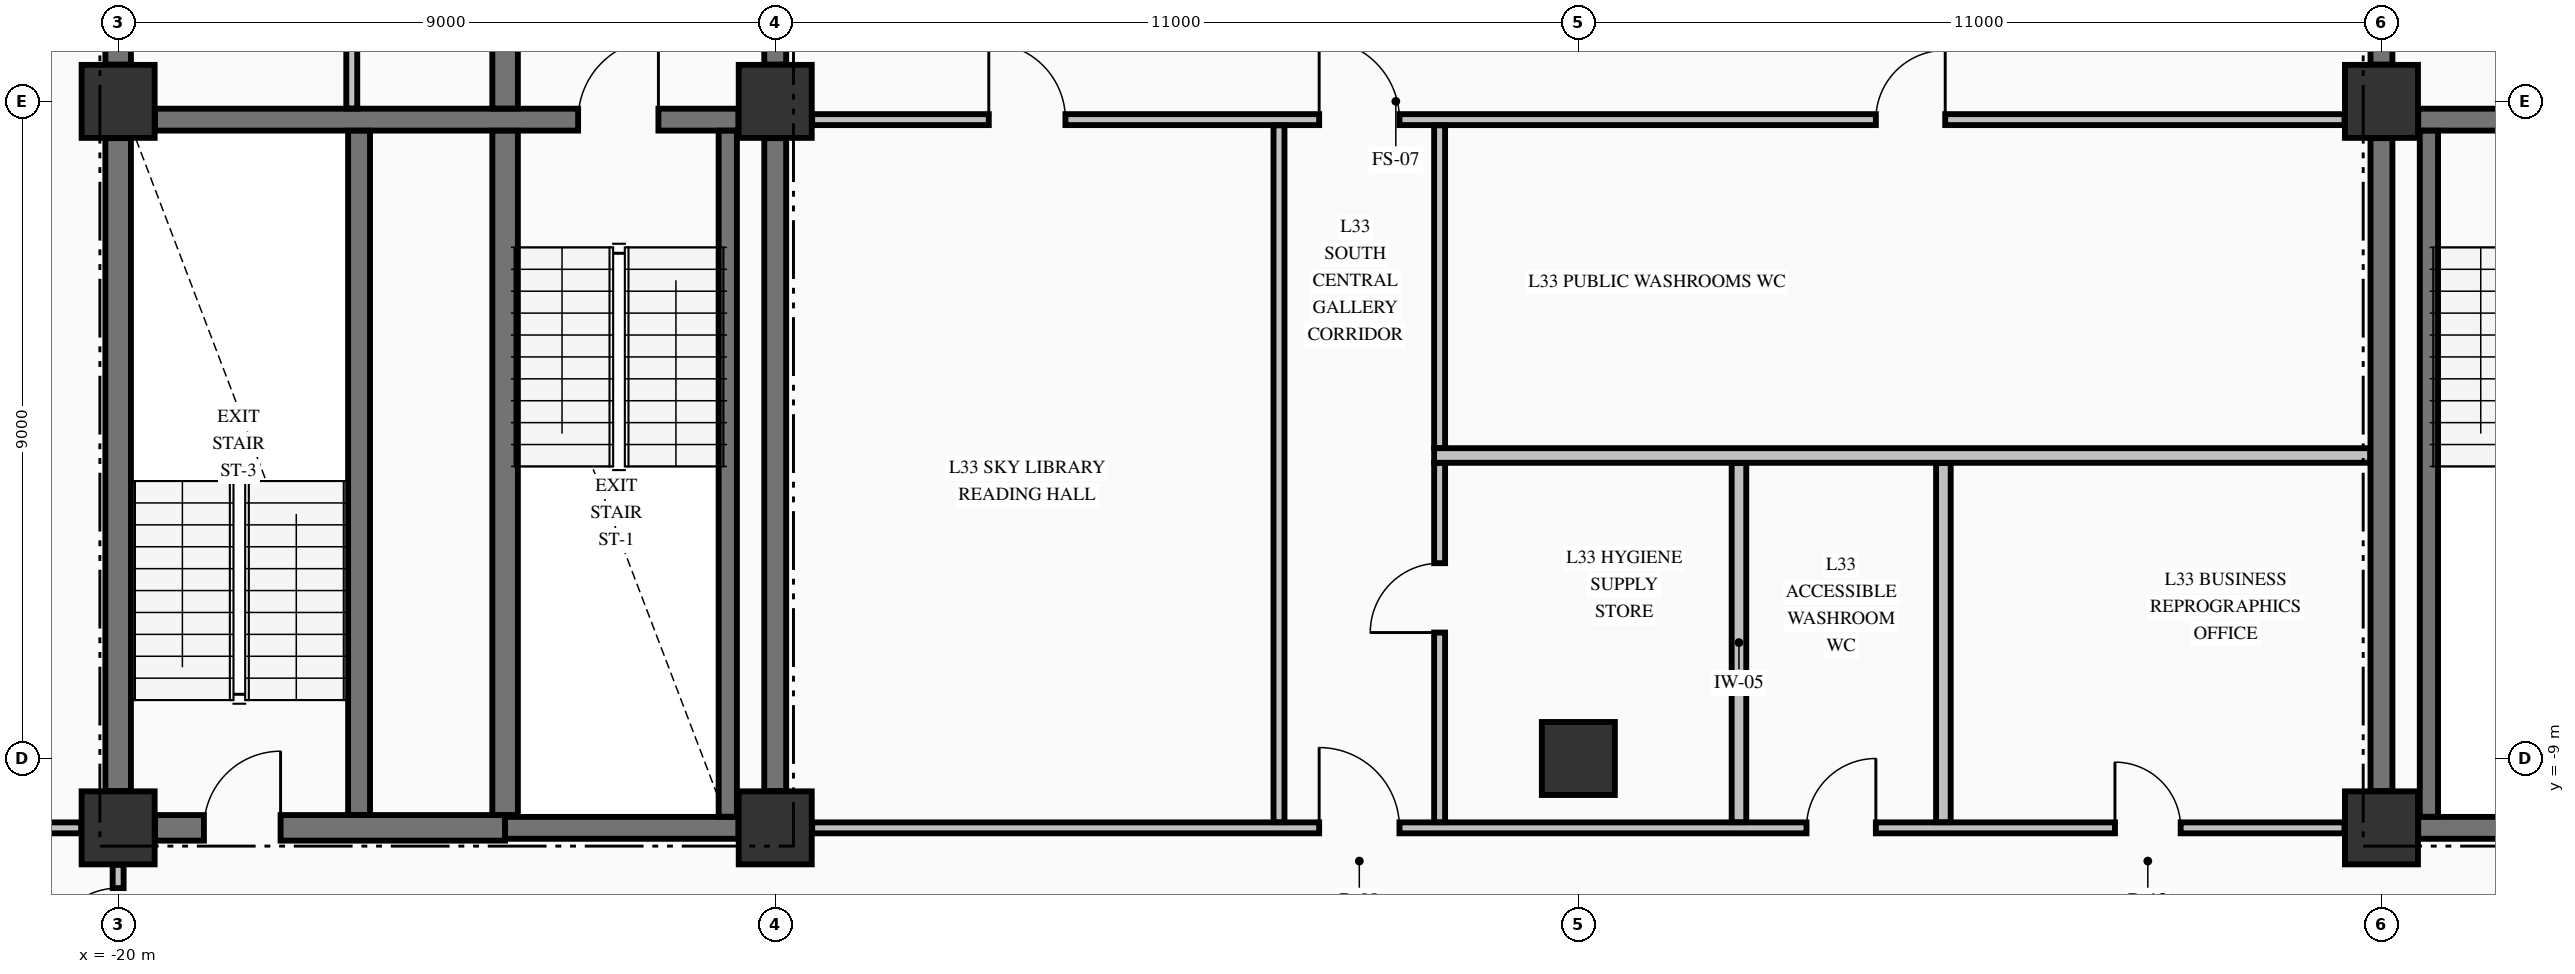
"""IFC4 building model, lengths in metres.
Left out: names, types, materials, properties, quantities, classifications, styles, units other than length and angle.
Written with IfcOpenShell. Run it as: python <this file> out.ifc"""

import sys

from ifc_helpers import new_model, si_unit, direction, frame, frame_2d, origin, origin_2d, place, context, subcontext, project, spatial, rectangle, extrude, element, fill, save


model = new_model("IFC4")
c1 = context("Model", 3, precision=1e-05, world=origin(), true_north=direction((0.0, 1.0)))
c2 = subcontext(c1, "Body", "Model", "MODEL_VIEW")
j1 = project(units=[si_unit("LENGTHUNIT", "METRE"), si_unit("PLANEANGLEUNIT", "RADIAN")], contexts=[c1])
p1 = place(None, origin())
s1 = spatial("IfcSite", under=j1, at=p1, CompositionType="ELEMENT")
p2 = place(p1, origin())
s2 = spatial("IfcBuilding", under=s1, at=p2, CompositionType="ELEMENT")
p3 = place(p2, frame((0.0, 0.0, 132.06)))
s3 = spatial("IfcBuildingStorey", under=s2, at=p3, CompositionType="ELEMENT", Elevation=132.06)
for number, where, z_axis, x_axis in (
    (1, (-20.0, -9.95, -0.25), (0.0, 0.0, 1.0), (1.0, 0.0, 0.0)),
    (2, (-11.0, -9.95, -0.25), (0.0, 0.0, 1.0), (1.0, 0.0, 0.0)),
    (3, (-11.0, 0.0, -0.25), (0.0, 0.0, 1.0), (1.0, 0.0, 0.0)),
    (4, (11.0, -9.95, -0.25), (0.0, 0.0, 1.0), (1.0, 0.0, 0.0)),
    (5, (11.0, 0.0, -0.25), (0.0, 0.0, 1.0), (1.0, 0.0, 0.0)),
    (6, (0.0, -9.0, -0.25), (0.0, 0.0, 1.0), (1.0, 0.0, 0.0)),
    (7, (-20.0, 0.0, -0.25), (0.0, 0.0, 1.0), (1.0, 0.0, 0.0)),
):
    element("IfcColumn", number, at=place(p3, frame(where, z_axis=z_axis, x_axis=x_axis)), inside=s3, PredefinedType="COLUMN", context=c2, shape_type="SweptSolid", body=[
        extrude(rectangle(XDim=1.0, YDim=1.0, at=origin_2d()), origin(), (0.0, 0.0, 1.0), 3.57),
    ])
p4 = place(p3, frame((-19.496, -9.95, 0.0), z_axis=(0.0, 0.0, 1.0), x_axis=(1.0, 0.0, 0.0)))
e8 = element("IfcWall", 8, at=p4, inside=s3, PredefinedType="SHEAR", context=c2, shape_type="SweptSolid", body=[
    extrude(rectangle(XDim=4.796, YDim=0.35, at=frame_2d((2.398, 0.0))), origin(), (0.0, 0.0, 1.0), 3.32),
])
p5 = place(p4, frame((0.671, 0.0, 0.0)))
e9 = element("IfcOpeningElement", 9, at=p5, cuts=e8, PredefinedType="OPENING", context=c2, shape_type="SweptSolid", body=[
    extrude(rectangle(XDim=1.05, YDim=2.15, at=frame_2d((0.525, 1.075))), frame((0.0, 0.185, 0.0), z_axis=(0.0, -1.0, 0.0), x_axis=(1.0, 0.0, 0.0)), (0.0, 0.0, 1.0), 0.37),
])
for number, where, z_axis, x_axis in (
    (10, (-14.7, -9.95, 0.0), (0.0, 0.0, 1.0), (1.0, 0.0, 0.0)),
    (11, (11.504, -9.95, 0.0), (0.0, 0.0, 1.0), (1.0, 0.0, 0.0)),
):
    element("IfcWall", number, at=place(p3, frame(where, z_axis=z_axis, x_axis=x_axis)), inside=s3, PredefinedType="SHEAR", context=c2, shape_type="SweptSolid", body=[
        extrude(rectangle(XDim=3.196, YDim=0.3, at=frame_2d((1.598, 0.0))), origin(), (0.0, 0.0, 1.0), 3.32),
    ])
p6 = place(p3, frame((-19.496, -0.25, 0.0), z_axis=(0.0, 0.0, 1.0), x_axis=(1.0, 0.0, 0.0)))
e12 = element("IfcWall", 12, at=p6, inside=s3, PredefinedType="SHEAR", context=c2, shape_type="SweptSolid", body=[
    extrude(rectangle(XDim=7.992, YDim=0.3, at=frame_2d((3.996, 0.0))), origin(), (0.0, 0.0, 1.0), 3.32),
])
p7 = place(p6, frame((5.796, 0.0, 0.0)))
e13 = element("IfcOpeningElement", 13, at=p7, cuts=e12, PredefinedType="OPENING", context=c2, shape_type="SweptSolid", body=[
    extrude(rectangle(XDim=1.1, YDim=2.15, at=frame_2d((0.55, 1.075))), frame((0.0, 0.16, 0.0), z_axis=(0.0, -1.0, 0.0), x_axis=(1.0, 0.0, 0.0)), (0.0, 0.0, 1.0), 0.32),
])
p8 = place(p3, frame((11.504, -0.25, 0.0), z_axis=(0.0, 0.0, 1.0), x_axis=(1.0, 0.0, 0.0)))
e14 = element("IfcWall", 14, at=p8, inside=s3, PredefinedType="SHEAR", context=c2, shape_type="SweptSolid", body=[
    extrude(rectangle(XDim=3.371, YDim=0.3, at=frame_2d((1.686, 0.0))), origin(), (0.0, 0.0, 1.0), 3.32),
])
p9 = place(p8, frame((1.096, 0.0, 0.0)))
e15 = element("IfcOpeningElement", 15, at=p9, cuts=e14, PredefinedType="OPENING", context=c2, shape_type="SweptSolid", body=[
    extrude(rectangle(XDim=1.1, YDim=2.15, at=frame_2d((0.55, 1.075))), frame((0.0, 0.16, 0.0), z_axis=(0.0, -1.0, 0.0), x_axis=(1.0, 0.0, 0.0)), (0.0, 0.0, 1.0), 0.32),
])
p10 = place(p3, frame((-27.835, -9.95, 0.0), z_axis=(0.0, 0.0, 1.0), x_axis=(1.0, 0.0, 0.0)))
e16 = element("IfcWall", 16, at=p10, inside=s3, PredefinedType="PARTITIONING", context=c2, shape_type="SweptSolid", body=[
    extrude(rectangle(XDim=7.329, YDim=0.15, at=frame_2d((3.665, 0.0))), origin(), (0.0, 0.0, 1.0), 3.32),
])
p11 = place(p10, frame((3.335, 0.0, 0.0)))
e17 = element("IfcOpeningElement", 17, at=p11, cuts=e16, PredefinedType="OPENING", context=c2, shape_type="SweptSolid", body=[
    extrude(rectangle(XDim=1.0, YDim=2.15, at=frame_2d((0.5, 1.075))), frame((0.0, 0.085, 0.0), z_axis=(0.0, -1.0, 0.0), x_axis=(1.0, 0.0, 0.0)), (0.0, 0.0, 1.0), 0.17),
])
p12 = place(p3, frame((-10.494, -9.95, 0.0), z_axis=(0.0, 0.0, 1.0), x_axis=(1.0, 0.0, 0.0)))
e18 = element("IfcWall", 18, at=p12, inside=s3, PredefinedType="PARTITIONING", context=c2, shape_type="SweptSolid", body=[
    extrude(rectangle(XDim=20.988, YDim=0.15, at=frame_2d((10.494, 0.0))), origin(), (0.0, 0.0, 1.0), 3.32),
])
p13 = place(p12, frame((6.944, 0.0, 0.0)))
e19 = element("IfcOpeningElement", 19, at=p13, cuts=e18, PredefinedType="OPENING", context=c2, shape_type="SweptSolid", body=[
    extrude(rectangle(XDim=1.1, YDim=2.15, at=frame_2d((0.55, 1.075))), frame((0.0, 0.085, 0.0), z_axis=(0.0, -1.0, 0.0), x_axis=(1.0, 0.0, 0.0)), (0.0, 0.0, 1.0), 0.17),
])
p14 = place(p12, frame((13.619, 0.0, 0.0)))
e20 = element("IfcOpeningElement", 20, at=p14, cuts=e18, PredefinedType="OPENING", context=c2, shape_type="SweptSolid", body=[
    extrude(rectangle(XDim=0.95, YDim=2.15, at=frame_2d((0.475, 1.075))), frame((0.0, 0.085, 0.0), z_axis=(0.0, -1.0, 0.0), x_axis=(1.0, 0.0, 0.0)), (0.0, 0.0, 1.0), 0.17),
])
p15 = place(p12, frame((17.844, 0.0, 0.0)))
e21 = element("IfcOpeningElement", 21, at=p15, cuts=e18, PredefinedType="OPENING", context=c2, shape_type="SweptSolid", body=[
    extrude(rectangle(XDim=0.9, YDim=2.15, at=frame_2d((0.45, 1.075))), frame((0.0, 0.085, 0.0), z_axis=(0.0, -1.0, 0.0), x_axis=(1.0, 0.0, 0.0)), (0.0, 0.0, 1.0), 0.17),
])
p16 = place(p3, frame((-1.975, -4.85, 0.0), z_axis=(0.0, 0.0, 1.0), x_axis=(1.0, 0.0, 0.0)))
e22 = element("IfcWall", 22, at=p16, inside=s3, PredefinedType="PARTITIONING", context=c2, shape_type="SweptSolid", body=[
    extrude(rectangle(XDim=12.822, YDim=0.2, at=frame_2d((6.411, 0.0))), origin(), (0.0, 0.0, 1.0), 3.32),
])
p17 = place(p3, frame((-10.494, -0.25, 0.0), z_axis=(0.0, 0.0, 1.0), x_axis=(1.0, 0.0, 0.0)))
e23 = element("IfcWall", 23, at=p17, inside=s3, PredefinedType="PARTITIONING", context=c2, shape_type="SweptSolid", body=[
    extrude(rectangle(XDim=20.988, YDim=0.15, at=frame_2d((10.494, 0.0))), origin(), (0.0, 0.0, 1.0), 3.32),
])
p18 = place(p17, frame((6.944, 0.0, 0.0)))
e24 = element("IfcOpeningElement", 24, at=p18, cuts=e23, PredefinedType="OPENING", context=c2, shape_type="SweptSolid", body=[
    extrude(rectangle(XDim=1.1, YDim=2.15, at=frame_2d((0.55, 1.075))), frame((0.0, 0.085, 0.0), z_axis=(0.0, -1.0, 0.0), x_axis=(1.0, 0.0, 0.0)), (0.0, 0.0, 1.0), 0.17),
])
p19 = place(p17, frame((2.419, 0.0, 0.0)))
e25 = element("IfcOpeningElement", 25, at=p19, cuts=e23, PredefinedType="OPENING", context=c2, shape_type="SweptSolid", body=[
    extrude(rectangle(XDim=1.05, YDim=2.15, at=frame_2d((0.525, 1.075))), frame((0.0, 0.085, 0.0), z_axis=(0.0, -1.0, 0.0), x_axis=(1.0, 0.0, 0.0)), (0.0, 0.0, 1.0), 0.17),
])
p20 = place(p17, frame((14.569, 0.0, 0.0)))
e26 = element("IfcOpeningElement", 26, at=p20, cuts=e23, PredefinedType="OPENING", context=c2, shape_type="SweptSolid", body=[
    extrude(rectangle(XDim=0.95, YDim=2.15, at=frame_2d((0.475, 1.075))), frame((0.0, 0.085, 0.0), z_axis=(0.0, -1.0, 0.0), x_axis=(1.0, 0.0, 0.0)), (0.0, 0.0, 1.0), 0.17),
])
p21 = place(p3, frame((-20.0, -9.446, 0.0), z_axis=(0.0, 0.0, 1.0), x_axis=(0.0, 1.0, 0.0)))
e27 = element("IfcWall", 27, at=p21, inside=s3, PredefinedType="SHEAR", context=c2, shape_type="SweptSolid", body=[
    extrude(rectangle(XDim=8.942, YDim=0.35, at=frame_2d((4.471, 0.0))), origin(), (0.0, 0.0, 1.0), 3.32),
])
p22 = place(p3, frame((-20.0, 0.504, 0.0), z_axis=(0.0, 0.0, 1.0), x_axis=(0.0, 1.0, 0.0)))
e28 = element("IfcWall", 28, at=p22, inside=s3, PredefinedType="SHEAR", context=c2, shape_type="SweptSolid", body=[
    extrude(rectangle(XDim=9.492, YDim=0.35, at=frame_2d((4.746, 0.0))), origin(), (0.0, 0.0, 1.0), 3.32),
])
p23 = place(p3, frame((-16.7, -9.773, 0.0), z_axis=(0.0, 0.0, 1.0), x_axis=(0.0, 1.0, 0.0)))
e29 = element("IfcWall", 29, at=p23, inside=s3, PredefinedType="SHEAR", context=c2, shape_type="SweptSolid", body=[
    extrude(rectangle(XDim=9.371, YDim=0.3, at=frame_2d((4.686, 0.0))), origin(), (0.0, 0.0, 1.0), 3.32),
])
p24 = place(p3, frame((-14.7, -9.773, 0.0), z_axis=(0.0, 0.0, 1.0), x_axis=(0.0, 1.0, 0.0)))
e30 = element("IfcWall", 30, at=p24, inside=s3, PredefinedType="SHEAR", context=c2, shape_type="SweptSolid", body=[
    extrude(rectangle(XDim=9.371, YDim=0.35, at=frame_2d((4.686, 0.0))), origin(), (0.0, 0.0, 1.0), 3.32),
])
p25 = place(p3, frame((-14.7, -0.098, 0.0), z_axis=(0.0, 0.0, 1.0), x_axis=(0.0, 1.0, 0.0)))
e31 = element("IfcWall", 31, at=p25, inside=s3, PredefinedType="SHEAR", context=c2, shape_type="SweptSolid", body=[
    extrude(rectangle(XDim=2.846, YDim=0.35, at=frame_2d((1.423, 0.0))), origin(), (0.0, 0.0, 1.0), 3.32),
])
p26 = place(p3, frame((-11.65, -9.798, 0.0), z_axis=(0.0, 0.0, 1.0), x_axis=(0.0, 1.0, 0.0)))
e32 = element("IfcWall", 32, at=p26, inside=s3, PredefinedType="SOLIDWALL", context=c2, shape_type="SweptSolid", body=[
    extrude(rectangle(XDim=9.396, YDim=0.25, at=frame_2d((4.698, 0.0))), origin(), (0.0, 0.0, 1.0), 3.32),
])
p27 = place(p3, frame((-11.0, -9.446, 0.0), z_axis=(0.0, 0.0, 1.0), x_axis=(0.0, 1.0, 0.0)))
e33 = element("IfcWall", 33, at=p27, inside=s3, PredefinedType="SHEAR", context=c2, shape_type="SweptSolid", body=[
    extrude(rectangle(XDim=8.942, YDim=0.3, at=frame_2d((4.471, 0.0))), origin(), (0.0, 0.0, 1.0), 3.32),
])
p28 = place(p3, frame((-11.0, 0.504, 0.0), z_axis=(0.0, 0.0, 1.0), x_axis=(0.0, 1.0, 0.0)))
e34 = element("IfcWall", 34, at=p28, inside=s3, PredefinedType="SHEAR", context=c2, shape_type="SweptSolid", body=[
    extrude(rectangle(XDim=2.244, YDim=0.3, at=frame_2d((1.122, 0.0))), origin(), (0.0, 0.0, 1.0), 3.32),
])
p29 = place(p28, frame((0.596, 0.0, 0.0)))
e35 = element("IfcOpeningElement", 35, at=p29, cuts=e34, PredefinedType="OPENING", context=c2, shape_type="SweptSolid", body=[
    extrude(rectangle(XDim=1.1, YDim=2.15, at=frame_2d((0.55, 1.075))), frame((0.0, 0.16, 0.0), z_axis=(0.0, -1.0, 0.0), x_axis=(1.0, 0.0, 0.0)), (0.0, 0.0, 1.0), 0.32),
])
p30 = place(p3, frame((11.0, -9.446, 0.0), z_axis=(0.0, 0.0, 1.0), x_axis=(0.0, 1.0, 0.0)))
e36 = element("IfcWall", 36, at=p30, inside=s3, PredefinedType="SHEAR", context=c2, shape_type="SweptSolid", body=[
    extrude(rectangle(XDim=8.942, YDim=0.3, at=frame_2d((4.471, 0.0))), origin(), (0.0, 0.0, 1.0), 3.32),
])
p31 = place(p3, frame((11.0, 0.504, 0.0), z_axis=(0.0, 0.0, 1.0), x_axis=(0.0, 1.0, 0.0)))
e37 = element("IfcWall", 37, at=p31, inside=s3, PredefinedType="SHEAR", context=c2, shape_type="SweptSolid", body=[
    extrude(rectangle(XDim=2.244, YDim=0.3, at=frame_2d((1.122, 0.0))), origin(), (0.0, 0.0, 1.0), 3.32),
])
p32 = place(p31, frame((0.596, 0.0, 0.0)))
e38 = element("IfcOpeningElement", 38, at=p32, cuts=e37, PredefinedType="OPENING", context=c2, shape_type="SweptSolid", body=[
    extrude(rectangle(XDim=1.1, YDim=2.15, at=frame_2d((0.55, 1.075))), frame((0.0, 0.16, 0.0), z_axis=(0.0, -1.0, 0.0), x_axis=(1.0, 0.0, 0.0)), (0.0, 0.0, 1.0), 0.32),
])
p33 = place(p3, frame((11.65, -9.798, 0.0), z_axis=(0.0, 0.0, 1.0), x_axis=(0.0, 1.0, 0.0)))
e39 = element("IfcWall", 39, at=p33, inside=s3, PredefinedType="SOLIDWALL", context=c2, shape_type="SweptSolid", body=[
    extrude(rectangle(XDim=9.396, YDim=0.25, at=frame_2d((4.698, 0.0))), origin(), (0.0, 0.0, 1.0), 3.32),
])
p34 = place(p3, frame((-20.0, -12.472, 0.0), z_axis=(0.0, 0.0, 1.0), x_axis=(0.0, 1.0, 0.0)))
e40 = element("IfcWall", 40, at=p34, inside=s3, PredefinedType="PARTITIONING", context=c2, shape_type="SweptSolid", body=[
    extrude(rectangle(XDim=2.016, YDim=0.15, at=frame_2d((1.008, 0.0))), origin(), (0.0, 0.0, 1.0), 2.81),
])
p35 = place(p34, frame((0.747, 0.0, 0.0)))
e41 = element("IfcOpeningElement", 41, at=p35, cuts=e40, PredefinedType="OPENING", context=c2, shape_type="SweptSolid", body=[
    extrude(rectangle(XDim=0.95, YDim=2.15, at=frame_2d((0.475, 1.075))), frame((0.0, 0.085, 0.0), z_axis=(0.0, -1.0, 0.0), x_axis=(1.0, 0.0, 0.0)), (0.0, 0.0, 1.0), 0.17),
])
p36 = place(p3, frame((-16.8, -0.097, 0.0), z_axis=(0.0, 0.0, 1.0), x_axis=(0.0, 1.0, 0.0)))
e42 = element("IfcWall", 42, at=p36, inside=s3, PredefinedType="PARTITIONING", context=c2, shape_type="SweptSolid", body=[
    extrude(rectangle(XDim=4.819, YDim=0.15, at=frame_2d((2.409, 0.0))), origin(), (0.0, 0.0, 1.0), 3.32),
])
p37 = place(p3, frame((-4.1, -9.872, 0.0), z_axis=(0.0, 0.0, 1.0), x_axis=(0.0, 1.0, 0.0)))
e43 = element("IfcWall", 43, at=p37, inside=s3, PredefinedType="PARTITIONING", context=c2, shape_type="SweptSolid", body=[
    extrude(rectangle(XDim=9.544, YDim=0.15, at=frame_2d((4.772, 0.0))), origin(), (0.0, 0.0, 1.0), 3.32),
])
p38 = place(p3, frame((-1.9, -9.872, 0.0), z_axis=(0.0, 0.0, 1.0), x_axis=(0.0, 1.0, 0.0)))
e44 = element("IfcWall", 44, at=p38, inside=s3, PredefinedType="PARTITIONING", context=c2, shape_type="SweptSolid", body=[
    extrude(rectangle(XDim=4.919, YDim=0.15, at=frame_2d((2.459, 0.0))), origin(), (0.0, 0.0, 1.0), 3.32),
])
p39 = place(p38, frame((2.597, 0.0, 0.0)))
e45 = element("IfcOpeningElement", 45, at=p39, cuts=e44, PredefinedType="OPENING", context=c2, shape_type="SweptSolid", body=[
    extrude(rectangle(XDim=0.95, YDim=2.15, at=frame_2d((0.475, 1.075))), frame((0.0, 0.085, 0.0), z_axis=(0.0, -1.0, 0.0), x_axis=(1.0, 0.0, 0.0)), (0.0, 0.0, 1.0), 0.17),
])
p40 = place(p3, frame((-1.9, -4.747, 0.0), z_axis=(0.0, 0.0, 1.0), x_axis=(0.0, 1.0, 0.0)))
e46 = element("IfcWall", 46, at=p40, inside=s3, PredefinedType="PARTITIONING", context=c2, shape_type="SweptSolid", body=[
    extrude(rectangle(XDim=4.419, YDim=0.15, at=frame_2d((2.209, 0.0))), origin(), (0.0, 0.0, 1.0), 3.32),
])
for number, where, z_axis, x_axis in (
    (47, (2.2, -9.872, 0.0), (0.0, 0.0, 1.0), (0.0, 1.0, 0.0)),
    (48, (5.0, -9.872, 0.0), (0.0, 0.0, 1.0), (0.0, 1.0, 0.0)),
):
    element("IfcWall", number, at=place(p3, frame(where, z_axis=z_axis, x_axis=x_axis)), inside=s3, PredefinedType="PARTITIONING", context=c2, shape_type="SweptSolid", body=[
        extrude(rectangle(XDim=4.919, YDim=0.2, at=frame_2d((2.459, 0.0))), origin(), (0.0, 0.0, 1.0), 3.32),
    ])
p41 = place(p7, origin())
e49 = element("IfcDoor", 49, at=p41, inside=s3, OperationType="SINGLE_SWING_RIGHT", PredefinedType="DOOR", context=c2, shape_type="SweptSolid", body=[
    extrude(rectangle(XDim=1.1, YDim=2.15, at=frame_2d((0.55, 1.075))), frame((0.0, 0.025, 0.0), z_axis=(0.0, -1.0, 0.0), x_axis=(1.0, 0.0, 0.0)), (0.0, 0.0, 1.0), 0.05),
])
fill(e13, e49)
p42 = place(p5, origin())
e50 = element("IfcDoor", 50, at=p42, inside=s3, OperationType="SINGLE_SWING_RIGHT", PredefinedType="DOOR", context=c2, shape_type="SweptSolid", body=[
    extrude(rectangle(XDim=1.05, YDim=2.15, at=frame_2d((0.525, 1.075))), frame((0.0, 0.025, 0.0), z_axis=(0.0, -1.0, 0.0), x_axis=(1.0, 0.0, 0.0)), (0.0, 0.0, 1.0), 0.05),
])
fill(e9, e50)
p43 = place(p13, origin())
e51 = element("IfcDoor", 51, at=p43, inside=s3, OperationType="SINGLE_SWING_LEFT", PredefinedType="DOOR", context=c2, shape_type="SweptSolid", body=[
    extrude(rectangle(XDim=1.1, YDim=2.15, at=frame_2d((0.55, 1.075))), frame((0.0, 0.025, 0.0), z_axis=(0.0, -1.0, 0.0), x_axis=(1.0, 0.0, 0.0)), (0.0, 0.0, 1.0), 0.05),
])
fill(e19, e51)
p44 = place(p18, origin())
e52 = element("IfcDoor", 52, at=p44, inside=s3, OperationType="SINGLE_SWING_LEFT", PredefinedType="DOOR", context=c2, shape_type="SweptSolid", body=[
    extrude(rectangle(XDim=1.1, YDim=2.15, at=frame_2d((0.55, 1.075))), frame((0.0, 0.025, 0.0), z_axis=(0.0, -1.0, 0.0), x_axis=(1.0, 0.0, 0.0)), (0.0, 0.0, 1.0), 0.05),
])
fill(e24, e52)
p45 = place(p19, origin())
e53 = element("IfcDoor", 53, at=p45, inside=s3, OperationType="SINGLE_SWING_LEFT", PredefinedType="DOOR", context=c2, shape_type="SweptSolid", body=[
    extrude(rectangle(XDim=1.05, YDim=2.15, at=frame_2d((0.525, 1.075))), frame((0.0, 0.025, 0.0), z_axis=(0.0, -1.0, 0.0), x_axis=(1.0, 0.0, 0.0)), (0.0, 0.0, 1.0), 0.05),
])
fill(e25, e53)
p46 = place(p20, origin())
e54 = element("IfcDoor", 54, at=p46, inside=s3, OperationType="SINGLE_SWING_RIGHT", PredefinedType="DOOR", context=c2, shape_type="SweptSolid", body=[
    extrude(rectangle(XDim=0.95, YDim=2.15, at=frame_2d((0.475, 1.075))), frame((0.0, 0.025, 0.0), z_axis=(0.0, -1.0, 0.0), x_axis=(1.0, 0.0, 0.0)), (0.0, 0.0, 1.0), 0.05),
])
fill(e26, e54)
p47 = place(p39, origin())
e55 = element("IfcDoor", 55, at=p47, inside=s3, OperationType="SINGLE_SWING_LEFT", PredefinedType="DOOR", context=c2, shape_type="SweptSolid", body=[
    extrude(rectangle(XDim=0.95, YDim=2.15, at=frame_2d((0.475, 1.075))), frame((0.0, 0.025, 0.0), z_axis=(0.0, -1.0, 0.0), x_axis=(1.0, 0.0, 0.0)), (0.0, 0.0, 1.0), 0.05),
])
fill(e45, e55)
p48 = place(p14, origin())
e56 = element("IfcDoor", 56, at=p48, inside=s3, OperationType="SINGLE_SWING_RIGHT", PredefinedType="DOOR", context=c2, shape_type="SweptSolid", body=[
    extrude(rectangle(XDim=0.95, YDim=2.15, at=frame_2d((0.475, 1.075))), frame((0.0, 0.025, 0.0), z_axis=(0.0, -1.0, 0.0), x_axis=(1.0, 0.0, 0.0)), (0.0, 0.0, 1.0), 0.05),
])
fill(e20, e56)
p49 = place(p15, origin())
e57 = element("IfcDoor", 57, at=p49, inside=s3, OperationType="SINGLE_SWING_LEFT", PredefinedType="DOOR", context=c2, shape_type="SweptSolid", body=[
    extrude(rectangle(XDim=0.9, YDim=2.15, at=frame_2d((0.45, 1.075))), frame((0.0, 0.025, 0.0), z_axis=(0.0, -1.0, 0.0), x_axis=(1.0, 0.0, 0.0)), (0.0, 0.0, 1.0), 0.05),
])
fill(e21, e57)
p50 = place(p35, origin())
e58 = element("IfcDoor", 58, at=p50, inside=s3, OperationType="SINGLE_SWING_LEFT", PredefinedType="DOOR", context=c2, shape_type="SweptSolid", body=[
    extrude(rectangle(XDim=0.95, YDim=2.15, at=frame_2d((0.475, 1.075))), frame((0.0, 0.025, 0.0), z_axis=(0.0, -1.0, 0.0), x_axis=(1.0, 0.0, 0.0)), (0.0, 0.0, 1.0), 0.05),
])
fill(e41, e58)
save(model, sys.argv[1])
